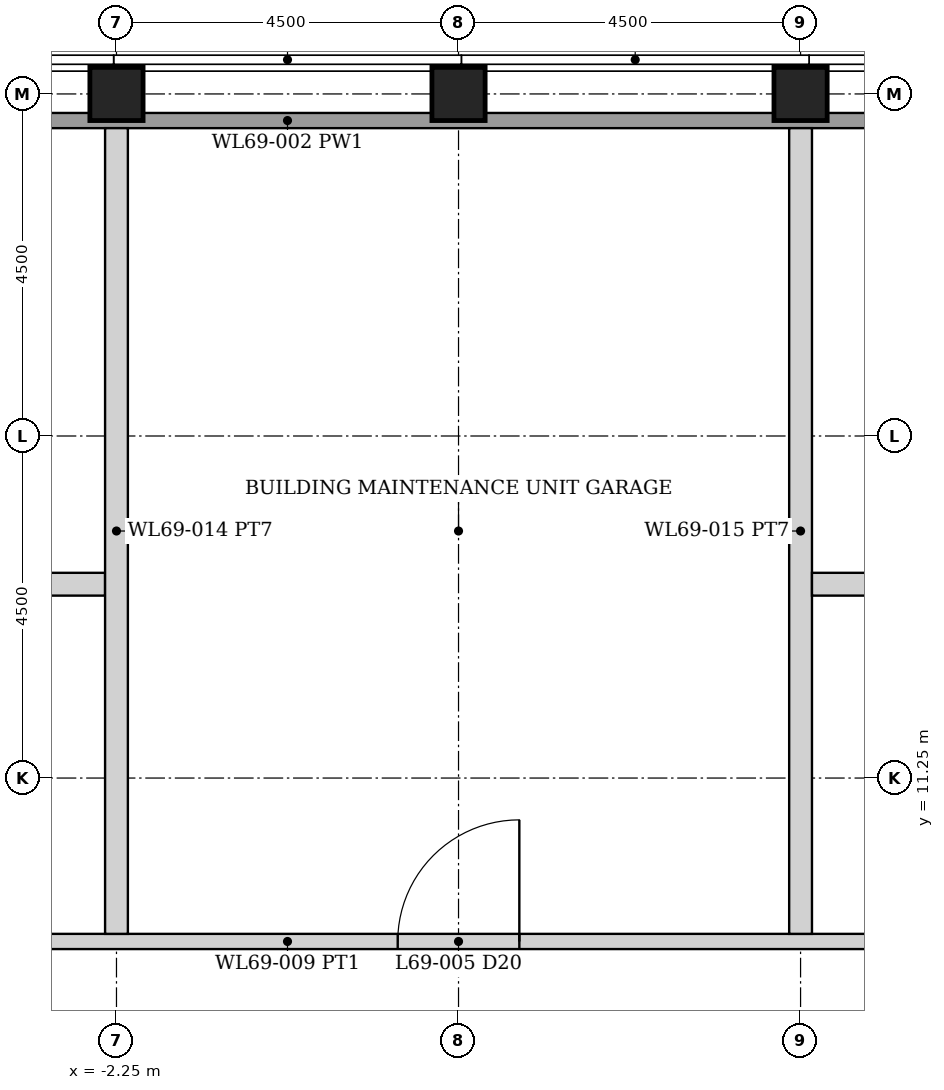
"""IFC4 building model, lengths in metres.
Left out: names, types, materials, properties, quantities, classifications, styles, units other than length and angle.
Written with IfcOpenShell. Run it as: python <this file> out.ifc"""

import sys

from ifc_helpers import new_model, si_unit, direction, frame, frame_2d, origin, origin_2d, place, context, subcontext, project, spatial, rectangle, hollow_rectangle, extrude, element, fill, save


model = new_model("IFC4")
c1 = context("Model", 3, precision=1e-05, world=origin(), true_north=direction((0.0, 1.0)))
c2 = subcontext(c1, "Body", "Model", "MODEL_VIEW")
j1 = project(units=[si_unit("LENGTHUNIT", "METRE"), si_unit("PLANEANGLEUNIT", "RADIAN")], contexts=[c1])
p1 = place(None, origin())
s1 = spatial("IfcSite", under=j1, at=p1, CompositionType="ELEMENT")
p2 = place(p1, origin())
s2 = spatial("IfcBuilding", under=s1, at=p2, CompositionType="ELEMENT")
p3 = place(p2, frame((0.0, 0.0, 268.05)))
s3 = spatial("IfcBuildingStorey", under=s2, at=p3, CompositionType="ELEMENT", Elevation=268.05)
for number, where, z_axis, x_axis in (
    (1, (-2.25, 20.25, 0.0), (0.0, 0.0, 1.0), (0.0, 1.0, 0.0)),
    (2, (2.25, 20.25, 0.0), (0.0, 0.0, 1.0), (0.0, 1.0, 0.0)),
    (3, (6.75, 20.25, 0.0), (0.0, 0.0, 1.0), (0.0, 1.0, 0.0)),
):
    element("IfcColumn", number, at=place(p3, frame(where, z_axis=z_axis, x_axis=x_axis)), inside=s3, PredefinedType="COLUMN", context=c2, shape_type="SweptSolid", body=[
        extrude(hollow_rectangle(XDim=0.7, YDim=0.7, WallThickness=0.035, at=origin_2d()), origin(), (0.0, 0.0, 1.0), 6.0),
    ])
p4 = place(p3, frame((-11.105, 19.9, 6.0), z_axis=(0.0, 0.0, 1.0), x_axis=(1.0, 0.0, 0.0)))
e4 = element("IfcWall", 4, at=p4, inside=s3, PredefinedType="PARAPET", context=c2, shape_type="SweptSolid", body=[
    extrude(rectangle(XDim=22.21, YDim=0.2, at=frame_2d((11.105, 0.0))), origin(), (0.0, 0.0, 1.0), 1.1),
])
p5 = place(p3, frame((-20.59, 9.1, 0.0), z_axis=(0.0, 0.0, 1.0), x_axis=(1.0, 0.0, 0.0)))
e5 = element("IfcWall", 5, at=p5, inside=s3, PredefinedType="PARTITIONING", context=c2, shape_type="SweptSolid", body=[
    extrude(rectangle(XDim=41.18, YDim=0.2, at=frame_2d((20.59, 0.0))), origin(), (0.0, 0.0, 1.0), 4.829),
])
p6 = place(p5, frame((4.265, 0.0, 0.0)))
e6 = element("IfcOpeningElement", 6, at=p6, cuts=e5, PredefinedType="OPENING", context=c2, shape_type="SweptSolid", body=[
    extrude(rectangle(XDim=1.6, YDim=2.4, at=frame_2d((0.8, 1.2))), frame((0.0, 0.11, 0.0), z_axis=(0.0, -1.0, 0.0), x_axis=(1.0, 0.0, 0.0)), (0.0, 0.0, 1.0), 0.22),
])
p7 = place(p5, frame((13.34, 0.0, 0.0)))
e7 = element("IfcOpeningElement", 7, at=p7, cuts=e5, PredefinedType="OPENING", context=c2, shape_type="SweptSolid", body=[
    extrude(rectangle(XDim=1.0, YDim=2.1, at=frame_2d((0.5, 1.05))), frame((0.0, 0.11, 0.0), z_axis=(0.0, -1.0, 0.0), x_axis=(1.0, 0.0, 0.0)), (0.0, 0.0, 1.0), 0.22),
])
p8 = place(p5, frame((22.04, 0.0, 0.0)))
e8 = element("IfcOpeningElement", 8, at=p8, cuts=e5, PredefinedType="OPENING", context=c2, shape_type="SweptSolid", body=[
    extrude(rectangle(XDim=1.6, YDim=2.4, at=frame_2d((0.8, 1.2))), frame((0.0, 0.11, 0.0), z_axis=(0.0, -1.0, 0.0), x_axis=(1.0, 0.0, 0.0)), (0.0, 0.0, 1.0), 0.22),
])
p9 = place(p5, frame((29.09, 0.0, 0.0)))
e9 = element("IfcOpeningElement", 9, at=p9, cuts=e5, PredefinedType="OPENING", context=c2, shape_type="SweptSolid", body=[
    extrude(rectangle(XDim=1.0, YDim=2.1, at=frame_2d((0.5, 1.05))), frame((0.0, 0.11, 0.0), z_axis=(0.0, -1.0, 0.0), x_axis=(1.0, 0.0, 0.0)), (0.0, 0.0, 1.0), 0.22),
])
p10 = place(p5, frame((35.315, 0.0, 0.0)))
e10 = element("IfcOpeningElement", 10, at=p10, cuts=e5, PredefinedType="OPENING", context=c2, shape_type="SweptSolid", body=[
    extrude(rectangle(XDim=1.6, YDim=2.4, at=frame_2d((0.8, 1.2))), frame((0.0, 0.11, 0.0), z_axis=(0.0, -1.0, 0.0), x_axis=(1.0, 0.0, 0.0)), (0.0, 0.0, 1.0), 0.22),
])
p11 = place(p3, frame((-11.1, 13.8, 0.0), z_axis=(0.0, 0.0, 1.0), x_axis=(1.0, 0.0, 0.0)))
e11 = element("IfcWall", 11, at=p11, inside=s3, PredefinedType="PARTITIONING", context=c2, shape_type="SweptSolid", body=[
    extrude(rectangle(XDim=8.7, YDim=0.3, at=frame_2d((4.35, 0.0))), origin(), (0.0, 0.0, 1.0), 4.829),
])
p12 = place(p11, frame((3.55, 0.0, 0.0)))
e12 = element("IfcOpeningElement", 12, at=p12, cuts=e11, PredefinedType="OPENING", context=c2, shape_type="SweptSolid", body=[
    extrude(rectangle(XDim=1.6, YDim=2.4, at=frame_2d((0.8, 1.2))), frame((0.0, 0.16, 0.0), z_axis=(0.0, -1.0, 0.0), x_axis=(1.0, 0.0, 0.0)), (0.0, 0.0, 1.0), 0.32),
])
for number, where, z_axis, x_axis in (
    (13, (-2.25, 9.2, 0.0), (0.0, 0.0, 1.0), (0.0, 1.0, 0.0)),
    (14, (6.75, 9.2, 0.0), (0.0, 0.0, 1.0), (0.0, 1.0, 0.0)),
):
    element("IfcWall", number, at=place(p3, frame(where, z_axis=z_axis, x_axis=x_axis)), inside=s3, PredefinedType="PARTITIONING", context=c2, shape_type="SweptSolid", body=[
        extrude(rectangle(XDim=10.6, YDim=0.3, at=frame_2d((5.3, 0.0))), origin(), (0.0, 0.0, 1.0), 4.829),
    ])
p13 = place(p3, frame((6.9, 13.8, 0.0), z_axis=(0.0, 0.0, 1.0), x_axis=(1.0, 0.0, 0.0)))
e15 = element("IfcWall", 15, at=p13, inside=s3, PredefinedType="PARTITIONING", context=c2, shape_type="SweptSolid", body=[
    extrude(rectangle(XDim=4.2, YDim=0.3, at=frame_2d((2.1, 0.0))), origin(), (0.0, 0.0, 1.0), 4.829),
])
p14 = place(p13, frame((1.6, 0.0, 0.0)))
e16 = element("IfcOpeningElement", 16, at=p14, cuts=e15, PredefinedType="OPENING", context=c2, shape_type="SweptSolid", body=[
    extrude(rectangle(XDim=1.0, YDim=2.1, at=frame_2d((0.5, 1.05))), frame((0.0, 0.16, 0.0), z_axis=(0.0, -1.0, 0.0), x_axis=(1.0, 0.0, 0.0)), (0.0, 0.0, 1.0), 0.32),
])
p15 = place(p8, origin())
e17 = element("IfcDoor", 17, at=p15, inside=s3, OperationType="SINGLE_SWING_RIGHT", PredefinedType="DOOR", context=c2, shape_type="SweptSolid", body=[
    extrude(rectangle(XDim=1.6, YDim=2.4, at=frame_2d((0.8, 1.2))), frame((0.0, 0.025, 0.0), z_axis=(0.0, -1.0, 0.0), x_axis=(1.0, 0.0, 0.0)), (0.0, 0.0, 1.0), 0.05),
])
fill(e8, e17)
save(model, sys.argv[1])
